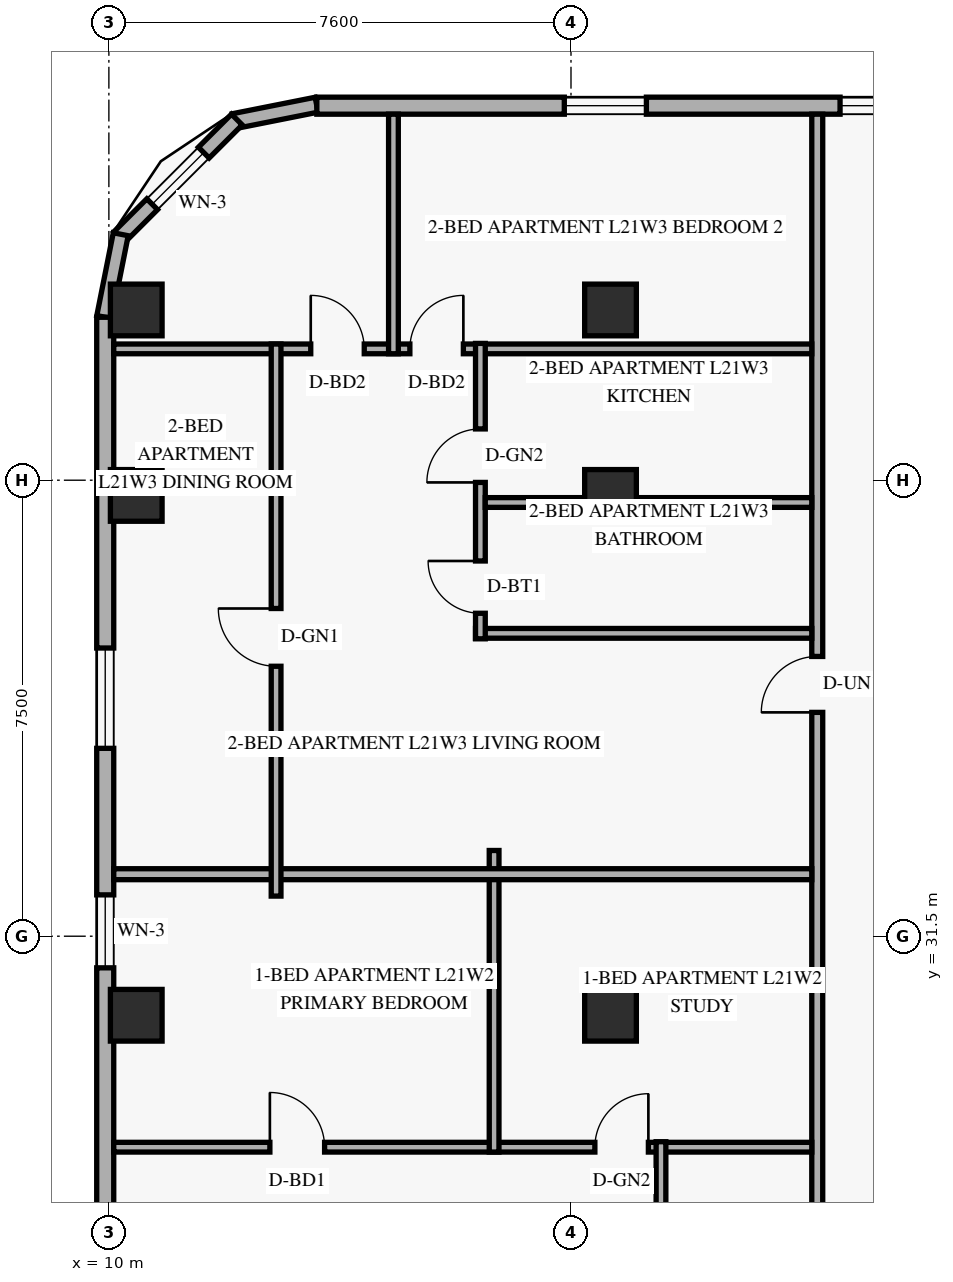
"""IFC4 building model, lengths in metres.
Left out: names, types, materials, properties, quantities, classifications, styles, units other than length and angle.
Written with IfcOpenShell. Run it as: python <this file> out.ifc"""

import sys

from ifc_helpers import new_model, si_unit, direction, frame, frame_2d, origin, origin_2d, place, context, subcontext, project, spatial, rectangle, extrude, element, fill, save


model = new_model("IFC4")
c1 = context("Model", 3, precision=1e-05, world=origin(), true_north=direction((0.0, 1.0)))
c2 = subcontext(c1, "Body", "Model", "MODEL_VIEW")
j1 = project(units=[si_unit("LENGTHUNIT", "METRE"), si_unit("PLANEANGLEUNIT", "RADIAN")], contexts=[c1])
p1 = place(None, origin())
s1 = spatial("IfcSite", under=j1, at=p1, CompositionType="ELEMENT")
p2 = place(p1, origin())
s2 = spatial("IfcBuilding", under=s1, at=p2, CompositionType="ELEMENT")
p3 = place(p2, frame((0.0, 0.0, 84.0)))
s3 = spatial("IfcBuildingStorey", under=s2, at=p3, CompositionType="ELEMENT", Elevation=84.0)
for number, where, z_axis, x_axis in (
    (1, (10.45, 30.2, 0.0), (0.0, 0.0, 1.0), (1.0, 0.0, 0.0)),
    (2, (10.45, 38.75, 0.0), (0.0, 0.0, 1.0), (1.0, 0.0, 0.0)),
    (3, (10.45, 41.8, 0.0), (0.0, 0.0, 1.0), (1.0, 0.0, 0.0)),
    (4, (18.25, 30.2, 0.0), (0.0, 0.0, 1.0), (1.0, 0.0, 0.0)),
    (5, (18.25, 38.75, 0.0), (0.0, 0.0, 1.0), (1.0, 0.0, 0.0)),
    (6, (18.25, 41.8, 0.0), (0.0, 0.0, 1.0), (1.0, 0.0, 0.0)),
):
    element("IfcColumn", number, at=place(p3, frame(where, z_axis=z_axis, x_axis=x_axis)), inside=s3, PredefinedType="COLUMN", context=c2, shape_type="SweptSolid", body=[
        extrude(rectangle(XDim=0.85, YDim=0.85, at=origin_2d()), origin(), (0.0, 0.0, 1.0), 3.6),
    ])
p4 = place(p3, frame((13.417, 45.176, 0.0), z_axis=(0.0, 0.0, 1.0), x_axis=(-0.980809899341, -0.19496651342, 0.0)))
e7 = element("IfcWall", 7, at=p4, inside=s3, PredefinedType="SOLIDWALL", context=c2, shape_type="SweptSolid", body=[
    extrude(rectangle(XDim=1.389, YDim=0.25, at=frame_2d((0.694, 0.0))), origin(), (0.0, 0.0, 1.0), 3.36),
])
p5 = place(p3, frame((12.105, 44.932, 0.0), z_axis=(0.0, 0.0, 1.0), x_axis=(-0.707151344399, -0.707062215165, 0.0)))
e8 = element("IfcWall", 8, at=p5, inside=s3, PredefinedType="SOLIDWALL", context=c2, shape_type="SweptSolid", body=[
    extrude(rectangle(XDim=2.739, YDim=0.25, at=frame_2d((1.37, 0.0))), origin(), (0.0, 0.0, 1.0), 3.36),
])
p6 = place(p5, frame((0.77, 0.0, 0.85)))
e9 = element("IfcOpeningElement", 9, at=p6, cuts=e8, PredefinedType="OPENING", context=c2, shape_type="SweptSolid", body=[
    extrude(rectangle(XDim=1.2, YDim=1.5, at=frame_2d((0.6, 0.75))), frame((0.0, 0.135, 0.0), z_axis=(0.0, -1.0, 0.0), x_axis=(1.0, 0.0, 0.0)), (0.0, 0.0, 1.0), 0.27),
])
p7 = place(p3, frame((10.195, 43.045, 0.0), z_axis=(0.0, 0.0, 1.0), x_axis=(-0.195000137217, -0.980803214965, 0.0)))
e10 = element("IfcWall", 10, at=p7, inside=s3, PredefinedType="SOLIDWALL", context=c2, shape_type="SweptSolid", body=[
    extrude(rectangle(XDim=1.388, YDim=0.25, at=frame_2d((0.694, 0.0))), origin(), (0.0, 0.0, 1.0), 3.36),
])
p8 = place(p3, frame((49.98, 45.16, 0.0), z_axis=(0.0, 0.0, 1.0), x_axis=(-1.0, 0.0, 0.0)))
e11 = element("IfcWall", 11, at=p8, inside=s3, PredefinedType="SOLIDWALL", context=c2, shape_type="SweptSolid", body=[
    extrude(rectangle(XDim=36.56, YDim=0.28, at=frame_2d((18.28, 0.0))), origin(), (0.0, 0.0, 1.0), 3.36),
])
p9 = place(p8, frame((31.14, 0.0, 0.85)))
e12 = element("IfcOpeningElement", 12, at=p9, cuts=e11, PredefinedType="OPENING", context=c2, shape_type="SweptSolid", body=[
    extrude(rectangle(XDim=1.35, YDim=1.55, at=frame_2d((0.675, 0.775))), frame((0.0, 0.15, 0.0), z_axis=(0.0, -1.0, 0.0), x_axis=(1.0, 0.0, 0.0)), (0.0, 0.0, 1.0), 0.3),
])
p10 = place(p8, frame((26.605, 0.0, 0.85)))
e13 = element("IfcOpeningElement", 13, at=p10, cuts=e11, PredefinedType="OPENING", context=c2, shape_type="SweptSolid", body=[
    extrude(rectangle(XDim=1.35, YDim=1.55, at=frame_2d((0.675, 0.775))), frame((0.0, 0.15, 0.0), z_axis=(0.0, -1.0, 0.0), x_axis=(1.0, 0.0, 0.0)), (0.0, 0.0, 1.0), 0.3),
])
p11 = place(p8, frame((22.754, 0.0, 0.85)))
e14 = element("IfcOpeningElement", 14, at=p11, cuts=e11, PredefinedType="OPENING", context=c2, shape_type="SweptSolid", body=[
    extrude(rectangle(XDim=1.35, YDim=1.55, at=frame_2d((0.675, 0.775))), frame((0.0, 0.15, 0.0), z_axis=(0.0, -1.0, 0.0), x_axis=(1.0, 0.0, 0.0)), (0.0, 0.0, 1.0), 0.3),
])
p12 = place(p8, frame((16.919, 0.0, 0.85)))
e15 = element("IfcOpeningElement", 15, at=p12, cuts=e11, PredefinedType="OPENING", context=c2, shape_type="SweptSolid", body=[
    extrude(rectangle(XDim=1.35, YDim=1.55, at=frame_2d((0.675, 0.775))), frame((0.0, 0.15, 0.0), z_axis=(0.0, -1.0, 0.0), x_axis=(1.0, 0.0, 0.0)), (0.0, 0.0, 1.0), 0.3),
])
p13 = place(p8, frame((12.82, 0.0, 0.85)))
e16 = element("IfcOpeningElement", 16, at=p13, cuts=e11, PredefinedType="OPENING", context=c2, shape_type="SweptSolid", body=[
    extrude(rectangle(XDim=1.35, YDim=1.55, at=frame_2d((0.675, 0.775))), frame((0.0, 0.15, 0.0), z_axis=(0.0, -1.0, 0.0), x_axis=(1.0, 0.0, 0.0)), (0.0, 0.0, 1.0), 0.3),
])
p14 = place(p8, frame((7.758, 0.0, 0.85)))
e17 = element("IfcOpeningElement", 17, at=p14, cuts=e11, PredefinedType="OPENING", context=c2, shape_type="SweptSolid", body=[
    extrude(rectangle(XDim=1.35, YDim=1.55, at=frame_2d((0.675, 0.775))), frame((0.0, 0.15, 0.0), z_axis=(0.0, -1.0, 0.0), x_axis=(1.0, 0.0, 0.0)), (0.0, 0.0, 1.0), 0.3),
])
p15 = place(p8, frame((1.542, 0.0, 0.85)))
e18 = element("IfcOpeningElement", 18, at=p15, cuts=e11, PredefinedType="OPENING", context=c2, shape_type="SweptSolid", body=[
    extrude(rectangle(XDim=1.35, YDim=1.55, at=frame_2d((0.675, 0.775))), frame((0.0, 0.15, 0.0), z_axis=(0.0, -1.0, 0.0), x_axis=(1.0, 0.0, 0.0)), (0.0, 0.0, 1.0), 0.3),
])
p16 = place(p3, frame((9.94, 41.68, 0.0), z_axis=(0.0, 0.0, 1.0), x_axis=(0.0, -1.0, 0.0)))
e19 = element("IfcWall", 19, at=p16, inside=s3, PredefinedType="SOLIDWALL", context=c2, shape_type="SweptSolid", body=[
    extrude(rectangle(XDim=35.36, YDim=0.28, at=frame_2d((17.68, 0.0))), origin(), (0.0, 0.0, 1.0), 3.36),
])
p17 = place(p16, frame((27.455, 0.0, 0.85)))
e20 = element("IfcOpeningElement", 20, at=p17, cuts=e19, PredefinedType="OPENING", context=c2, shape_type="SweptSolid", body=[
    extrude(rectangle(XDim=1.65, YDim=1.6, at=frame_2d((0.825, 0.8))), frame((0.0, 0.15, 0.0), z_axis=(0.0, -1.0, 0.0), x_axis=(1.0, 0.0, 0.0)), (0.0, 0.0, 1.0), 0.3),
])
p18 = place(p16, frame((21.206, 0.0, 0.85)))
e21 = element("IfcOpeningElement", 21, at=p18, cuts=e19, PredefinedType="OPENING", context=c2, shape_type="SweptSolid", body=[
    extrude(rectangle(XDim=1.65, YDim=1.6, at=frame_2d((0.825, 0.8))), frame((0.0, 0.15, 0.0), z_axis=(0.0, -1.0, 0.0), x_axis=(1.0, 0.0, 0.0)), (0.0, 0.0, 1.0), 0.3),
])
p19 = place(p16, frame((16.209, 0.0, 0.85)))
e22 = element("IfcOpeningElement", 22, at=p19, cuts=e19, PredefinedType="OPENING", context=c2, shape_type="SweptSolid", body=[
    extrude(rectangle(XDim=1.65, YDim=1.6, at=frame_2d((0.825, 0.8))), frame((0.0, 0.15, 0.0), z_axis=(0.0, -1.0, 0.0), x_axis=(1.0, 0.0, 0.0)), (0.0, 0.0, 1.0), 0.3),
])
p20 = place(p16, frame((9.5, 0.0, 0.85)))
e23 = element("IfcOpeningElement", 23, at=p20, cuts=e19, PredefinedType="OPENING", context=c2, shape_type="SweptSolid", body=[
    extrude(rectangle(XDim=1.2, YDim=1.5, at=frame_2d((0.6, 0.75))), frame((0.0, 0.15, 0.0), z_axis=(0.0, -1.0, 0.0), x_axis=(1.0, 0.0, 0.0)), (0.0, 0.0, 1.0), 0.3),
])
p21 = place(p16, frame((5.44, 0.0, 0.85)))
e24 = element("IfcOpeningElement", 24, at=p21, cuts=e19, PredefinedType="OPENING", context=c2, shape_type="SweptSolid", body=[
    extrude(rectangle(XDim=1.65, YDim=1.6, at=frame_2d((0.825, 0.8))), frame((0.0, 0.15, 0.0), z_axis=(0.0, -1.0, 0.0), x_axis=(1.0, 0.0, 0.0)), (0.0, 0.0, 1.0), 0.3),
])
p22 = place(p3, frame((21.65, 2.98, 0.0), z_axis=(0.0, 0.0, 1.0), x_axis=(0.0, 1.0, 0.0)))
e25 = element("IfcWall", 25, at=p22, inside=s3, PredefinedType="STANDARD", context=c2, shape_type="SweptSolid", body=[
    extrude(rectangle(XDim=42.04, YDim=0.18, at=frame_2d((21.02, 0.0))), origin(), (0.0, 0.0, 1.0), 2.731),
])
p23 = place(p22, frame((9.116, 0.0, 0.0)))
e26 = element("IfcOpeningElement", 26, at=p23, cuts=e25, PredefinedType="OPENING", context=c2, shape_type="SweptSolid", body=[
    extrude(rectangle(XDim=0.92, YDim=2.15, at=frame_2d((0.46, 1.075))), frame((0.0, 0.1, 0.0), z_axis=(0.0, -1.0, 0.0), x_axis=(1.0, 0.0, 0.0)), (0.0, 0.0, 1.0), 0.2),
])
p24 = place(p22, frame((19.1, 0.0, 0.0)))
e27 = element("IfcOpeningElement", 27, at=p24, cuts=e25, PredefinedType="OPENING", context=c2, shape_type="SweptSolid", body=[
    extrude(rectangle(XDim=0.92, YDim=2.15, at=frame_2d((0.46, 1.075))), frame((0.0, 0.1, 0.0), z_axis=(0.0, -1.0, 0.0), x_axis=(1.0, 0.0, 0.0)), (0.0, 0.0, 1.0), 0.2),
])
p25 = place(p22, frame((32.201, 0.0, 0.0)))
e28 = element("IfcOpeningElement", 28, at=p25, cuts=e25, PredefinedType="OPENING", context=c2, shape_type="SweptSolid", body=[
    extrude(rectangle(XDim=0.92, YDim=2.15, at=frame_2d((0.46, 1.075))), frame((0.0, 0.1, 0.0), z_axis=(0.0, -1.0, 0.0), x_axis=(1.0, 0.0, 0.0)), (0.0, 0.0, 1.0), 0.2),
])
p26 = place(p3, frame((10.08, 28.03, 0.0), z_axis=(0.0, 0.0, 1.0), x_axis=(1.0, 0.0, 0.0)))
e29 = element("IfcWall", 29, at=p26, inside=s3, PredefinedType="PARTITIONING", context=c2, shape_type="SweptSolid", body=[
    extrude(rectangle(XDim=11.48, YDim=0.16, at=frame_2d((5.74, 0.0))), origin(), (0.0, 0.0, 1.0), 2.731),
])
p27 = place(p26, frame((7.913, 0.0, 0.0)))
e30 = element("IfcOpeningElement", 30, at=p27, cuts=e29, PredefinedType="OPENING", context=c2, shape_type="SweptSolid", body=[
    extrude(rectangle(XDim=0.88, YDim=2.12, at=frame_2d((0.44, 1.06))), frame((0.0, 0.09, 0.0), z_axis=(0.0, -1.0, 0.0), x_axis=(1.0, 0.0, 0.0)), (0.0, 0.0, 1.0), 0.18),
])
p28 = place(p26, frame((2.568, 0.0, 0.0)))
e31 = element("IfcOpeningElement", 31, at=p28, cuts=e29, PredefinedType="OPENING", context=c2, shape_type="SweptSolid", body=[
    extrude(rectangle(XDim=0.9, YDim=2.14, at=frame_2d((0.45, 1.07))), frame((0.0, 0.09, 0.0), z_axis=(0.0, -1.0, 0.0), x_axis=(1.0, 0.0, 0.0)), (0.0, 0.0, 1.0), 0.18),
])
p29 = place(p3, frame((19.08, 23.29, 0.0), z_axis=(0.0, 0.0, 1.0), x_axis=(0.0, 1.0, 0.0)))
e32 = element("IfcWall", 32, at=p29, inside=s3, PredefinedType="PLUMBINGWALL", context=c2, shape_type="SweptSolid", body=[
    extrude(rectangle(XDim=4.83, YDim=0.16, at=frame_2d((2.415, 0.0))), origin(), (0.0, 0.0, 1.0), 3.36),
])
p30 = place(p29, frame((0.42, 0.0, 0.0)))
e33 = element("IfcOpeningElement", 33, at=p30, cuts=e32, PredefinedType="OPENING", context=c2, shape_type="SweptSolid", body=[
    extrude(rectangle(XDim=0.86, YDim=2.12, at=frame_2d((0.43, 1.06))), frame((0.0, 0.09, 0.0), z_axis=(0.0, -1.0, 0.0), x_axis=(1.0, 0.0, 0.0)), (0.0, 0.0, 1.0), 0.18),
])
p31 = place(p29, frame((2.559, 0.0, 0.0)))
e34 = element("IfcOpeningElement", 34, at=p31, cuts=e32, PredefinedType="OPENING", context=c2, shape_type="SweptSolid", body=[
    extrude(rectangle(XDim=0.88, YDim=2.12, at=frame_2d((0.44, 1.06))), frame((0.0, 0.09, 0.0), z_axis=(0.0, -1.0, 0.0), x_axis=(1.0, 0.0, 0.0)), (0.0, 0.0, 1.0), 0.18),
])
p32 = place(p3, frame((16.335, 27.95, 0.0), z_axis=(0.0, 0.0, 1.0), x_axis=(0.0, 1.0, 0.0)))
e35 = element("IfcWall", 35, at=p32, inside=s3, PredefinedType="PARTITIONING", context=c2, shape_type="SweptSolid", body=[
    extrude(rectangle(XDim=4.96, YDim=0.16, at=frame_2d((2.48, 0.0))), origin(), (0.0, 0.0, 1.0), 2.731),
])
p33 = place(p3, frame((10.08, 32.52, 0.0), z_axis=(0.0, 0.0, 1.0), x_axis=(1.0, 0.0, 0.0)))
e36 = element("IfcWall", 36, at=p33, inside=s3, PredefinedType="PARTITIONING", context=c2, shape_type="SweptSolid", body=[
    extrude(rectangle(XDim=11.48, YDim=0.18, at=frame_2d((5.74, 0.0))), origin(), (0.0, 0.0, 1.0), 2.731),
])
p34 = place(p3, frame((10.08, 41.16, 0.0), z_axis=(0.0, 0.0, 1.0), x_axis=(1.0, 0.0, 0.0)))
e37 = element("IfcWall", 37, at=p34, inside=s3, PredefinedType="PARTITIONING", context=c2, shape_type="SweptSolid", body=[
    extrude(rectangle(XDim=11.48, YDim=0.16, at=frame_2d((5.74, 0.0))), origin(), (0.0, 0.0, 1.0), 2.731),
])
p35 = place(p34, frame((3.24, 0.0, 0.0)))
e38 = element("IfcOpeningElement", 38, at=p35, cuts=e37, PredefinedType="OPENING", context=c2, shape_type="SweptSolid", body=[
    extrude(rectangle(XDim=0.88, YDim=2.14, at=frame_2d((0.44, 1.07))), frame((0.0, 0.09, 0.0), z_axis=(0.0, -1.0, 0.0), x_axis=(1.0, 0.0, 0.0)), (0.0, 0.0, 1.0), 0.18),
])
p36 = place(p34, frame((4.87, 0.0, 0.0)))
e39 = element("IfcOpeningElement", 39, at=p36, cuts=e37, PredefinedType="OPENING", context=c2, shape_type="SweptSolid", body=[
    extrude(rectangle(XDim=0.88, YDim=2.14, at=frame_2d((0.44, 1.07))), frame((0.0, 0.09, 0.0), z_axis=(0.0, -1.0, 0.0), x_axis=(1.0, 0.0, 0.0)), (0.0, 0.0, 1.0), 0.18),
])
p37 = place(p3, frame((16.03, 36.481, 0.0), z_axis=(0.0, 0.0, 1.0), x_axis=(1.0, 0.0, 0.0)))
e40 = element("IfcWall", 40, at=p37, inside=s3, PredefinedType="PLUMBINGWALL", context=c2, shape_type="SweptSolid", body=[
    extrude(rectangle(XDim=5.53, YDim=0.16, at=frame_2d((2.765, 0.0))), origin(), (0.0, 0.0, 1.0), 2.731),
])
p38 = place(p3, frame((16.11, 36.392, 0.0), z_axis=(0.0, 0.0, 1.0), x_axis=(0.0, 1.0, 0.0)))
e41 = element("IfcWall", 41, at=p38, inside=s3, PredefinedType="PLUMBINGWALL", context=c2, shape_type="SweptSolid", body=[
    extrude(rectangle(XDim=4.858, YDim=0.16, at=frame_2d((2.429, 0.0))), origin(), (0.0, 0.0, 1.0), 2.731),
])
p39 = place(p38, frame((0.42, 0.0, 0.0)))
e42 = element("IfcOpeningElement", 42, at=p39, cuts=e41, PredefinedType="OPENING", context=c2, shape_type="SweptSolid", body=[
    extrude(rectangle(XDim=0.86, YDim=2.12, at=frame_2d((0.43, 1.06))), frame((0.0, 0.09, 0.0), z_axis=(0.0, -1.0, 0.0), x_axis=(1.0, 0.0, 0.0)), (0.0, 0.0, 1.0), 0.18),
])
p40 = place(p38, frame((2.572, 0.0, 0.0)))
e43 = element("IfcOpeningElement", 43, at=p40, cuts=e41, PredefinedType="OPENING", context=c2, shape_type="SweptSolid", body=[
    extrude(rectangle(XDim=0.88, YDim=2.12, at=frame_2d((0.44, 1.06))), frame((0.0, 0.09, 0.0), z_axis=(0.0, -1.0, 0.0), x_axis=(1.0, 0.0, 0.0)), (0.0, 0.0, 1.0), 0.18),
])
p41 = place(p3, frame((16.19, 38.634, 0.0), z_axis=(0.0, 0.0, 1.0), x_axis=(1.0, 0.0, 0.0)))
e44 = element("IfcWall", 44, at=p41, inside=s3, PredefinedType="PLUMBINGWALL", context=c2, shape_type="SweptSolid", body=[
    extrude(rectangle(XDim=5.37, YDim=0.16, at=frame_2d((2.685, 0.0))), origin(), (0.0, 0.0, 1.0), 2.731),
])
p42 = place(p3, frame((12.75, 32.16, 0.0), z_axis=(0.0, 0.0, 1.0), x_axis=(0.0, 1.0, 0.0)))
e45 = element("IfcWall", 45, at=p42, inside=s3, PredefinedType="PARTITIONING", context=c2, shape_type="SweptSolid", body=[
    extrude(rectangle(XDim=9.08, YDim=0.16, at=frame_2d((4.54, 0.0))), origin(), (0.0, 0.0, 1.0), 2.731),
])
p43 = place(p42, frame((3.78, 0.0, 0.0)))
e46 = element("IfcOpeningElement", 46, at=p43, cuts=e45, PredefinedType="OPENING", context=c2, shape_type="SweptSolid", body=[
    extrude(rectangle(XDim=0.95, YDim=2.15, at=frame_2d((0.475, 1.075))), frame((0.0, 0.09, 0.0), z_axis=(0.0, -1.0, 0.0), x_axis=(1.0, 0.0, 0.0)), (0.0, 0.0, 1.0), 0.18),
])
p44 = place(p3, frame((14.68, 41.08, 0.0), z_axis=(0.0, 0.0, 1.0), x_axis=(0.0, 1.0, 0.0)))
e47 = element("IfcWall", 47, at=p44, inside=s3, PredefinedType="PARTITIONING", context=c2, shape_type="SweptSolid", body=[
    extrude(rectangle(XDim=3.94, YDim=0.16, at=frame_2d((1.97, 0.0))), origin(), (0.0, 0.0, 1.0), 2.809),
])
p45 = place(p6, origin())
e48 = element("IfcWindow", 48, at=p45, inside=s3, PartitioningType="SINGLE_PANEL", PredefinedType="WINDOW", context=c2, shape_type="SweptSolid", body=[
    extrude(rectangle(XDim=1.2, YDim=1.5, at=frame_2d((0.6, 0.75))), frame((0.0, 0.03, 0.0), z_axis=(0.0, -1.0, 0.0), x_axis=(1.0, 0.0, 0.0)), (0.0, 0.0, 1.0), 0.06),
])
fill(e9, e48)
p46 = place(p9, origin())
e49 = element("IfcWindow", 49, at=p46, inside=s3, PartitioningType="SINGLE_PANEL", PredefinedType="WINDOW", context=c2, shape_type="SweptSolid", body=[
    extrude(rectangle(XDim=1.35, YDim=1.55, at=frame_2d((0.675, 0.775))), frame((0.0, 0.03, 0.0), z_axis=(0.0, -1.0, 0.0), x_axis=(1.0, 0.0, 0.0)), (0.0, 0.0, 1.0), 0.06),
])
fill(e12, e49)
p47 = place(p10, origin())
e50 = element("IfcWindow", 50, at=p47, inside=s3, PartitioningType="SINGLE_PANEL", PredefinedType="WINDOW", context=c2, shape_type="SweptSolid", body=[
    extrude(rectangle(XDim=1.35, YDim=1.55, at=frame_2d((0.675, 0.775))), frame((0.0, 0.03, 0.0), z_axis=(0.0, -1.0, 0.0), x_axis=(1.0, 0.0, 0.0)), (0.0, 0.0, 1.0), 0.06),
])
fill(e13, e50)
p48 = place(p20, origin())
e51 = element("IfcWindow", 51, at=p48, inside=s3, PartitioningType="SINGLE_PANEL", PredefinedType="WINDOW", context=c2, shape_type="SweptSolid", body=[
    extrude(rectangle(XDim=1.2, YDim=1.5, at=frame_2d((0.6, 0.75))), frame((0.0, 0.03, 0.0), z_axis=(0.0, -1.0, 0.0), x_axis=(1.0, 0.0, 0.0)), (0.0, 0.0, 1.0), 0.06),
])
fill(e23, e51)
p49 = place(p21, origin())
e52 = element("IfcWindow", 52, at=p49, inside=s3, PartitioningType="SINGLE_PANEL", PredefinedType="WINDOW", context=c2, shape_type="SweptSolid", body=[
    extrude(rectangle(XDim=1.65, YDim=1.6, at=frame_2d((0.825, 0.8))), frame((0.0, 0.03, 0.0), z_axis=(0.0, -1.0, 0.0), x_axis=(1.0, 0.0, 0.0)), (0.0, 0.0, 1.0), 0.06),
])
fill(e24, e52)
p50 = place(p27, origin())
e53 = element("IfcDoor", 53, at=p50, inside=s3, OperationType="SINGLE_SWING_RIGHT", PredefinedType="DOOR", context=c2, shape_type="SweptSolid", body=[
    extrude(rectangle(XDim=0.88, YDim=2.12, at=frame_2d((0.44, 1.06))), frame((0.0, 0.025, 0.0), z_axis=(0.0, -1.0, 0.0), x_axis=(1.0, 0.0, 0.0)), (0.0, 0.0, 1.0), 0.05),
])
fill(e30, e53)
p51 = place(p28, origin())
e54 = element("IfcDoor", 54, at=p51, inside=s3, OperationType="SINGLE_SWING_LEFT", PredefinedType="DOOR", context=c2, shape_type="SweptSolid", body=[
    extrude(rectangle(XDim=0.9, YDim=2.14, at=frame_2d((0.45, 1.07))), frame((0.0, 0.025, 0.0), z_axis=(0.0, -1.0, 0.0), x_axis=(1.0, 0.0, 0.0)), (0.0, 0.0, 1.0), 0.05),
])
fill(e31, e54)
p52 = place(p43, origin())
e55 = element("IfcDoor", 55, at=p52, inside=s3, OperationType="SINGLE_SWING_RIGHT", PredefinedType="DOOR", context=c2, shape_type="SweptSolid", body=[
    extrude(rectangle(XDim=0.95, YDim=2.15, at=frame_2d((0.475, 1.075))), frame((0.0, 0.025, 0.0), z_axis=(0.0, -1.0, 0.0), x_axis=(1.0, 0.0, 0.0)), (0.0, 0.0, 1.0), 0.05),
])
fill(e46, e55)
p53 = place(p25, origin())
e56 = element("IfcDoor", 56, at=p53, inside=s3, OperationType="SINGLE_SWING_LEFT", PredefinedType="DOOR", context=c2, shape_type="SweptSolid", body=[
    extrude(rectangle(XDim=0.92, YDim=2.15, at=frame_2d((0.46, 1.075))), frame((0.0, 0.025, 0.0), z_axis=(0.0, -1.0, 0.0), x_axis=(1.0, 0.0, 0.0)), (0.0, 0.0, 1.0), 0.05),
])
fill(e28, e56)
p54 = place(p39, origin())
e57 = element("IfcDoor", 57, at=p54, inside=s3, OperationType="SINGLE_SWING_RIGHT", PredefinedType="DOOR", context=c2, shape_type="SweptSolid", body=[
    extrude(rectangle(XDim=0.86, YDim=2.12, at=frame_2d((0.43, 1.06))), frame((0.0, 0.025, 0.0), z_axis=(0.0, -1.0, 0.0), x_axis=(1.0, 0.0, 0.0)), (0.0, 0.0, 1.0), 0.05),
])
fill(e42, e57)
p55 = place(p40, origin())
e58 = element("IfcDoor", 58, at=p55, inside=s3, OperationType="SINGLE_SWING_LEFT", PredefinedType="DOOR", context=c2, shape_type="SweptSolid", body=[
    extrude(rectangle(XDim=0.88, YDim=2.12, at=frame_2d((0.44, 1.06))), frame((0.0, 0.025, 0.0), z_axis=(0.0, -1.0, 0.0), x_axis=(1.0, 0.0, 0.0)), (0.0, 0.0, 1.0), 0.05),
])
fill(e43, e58)
p56 = place(p35, origin())
e59 = element("IfcDoor", 59, at=p56, inside=s3, OperationType="SINGLE_SWING_LEFT", PredefinedType="DOOR", context=c2, shape_type="SweptSolid", body=[
    extrude(rectangle(XDim=0.88, YDim=2.14, at=frame_2d((0.44, 1.07))), frame((0.0, 0.025, 0.0), z_axis=(0.0, -1.0, 0.0), x_axis=(1.0, 0.0, 0.0)), (0.0, 0.0, 1.0), 0.05),
])
fill(e38, e59)
p57 = place(p36, origin())
e60 = element("IfcDoor", 60, at=p57, inside=s3, OperationType="SINGLE_SWING_RIGHT", PredefinedType="DOOR", context=c2, shape_type="SweptSolid", body=[
    extrude(rectangle(XDim=0.88, YDim=2.14, at=frame_2d((0.44, 1.07))), frame((0.0, 0.025, 0.0), z_axis=(0.0, -1.0, 0.0), x_axis=(1.0, 0.0, 0.0)), (0.0, 0.0, 1.0), 0.05),
])
fill(e39, e60)
save(model, sys.argv[1])
